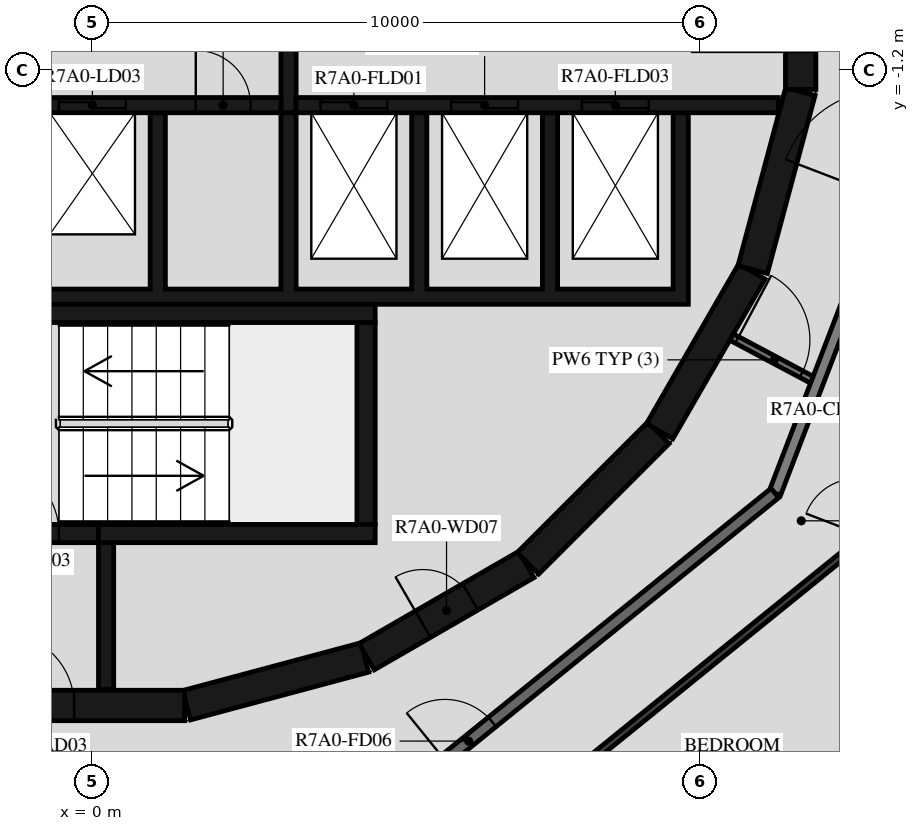
"""IFC4 building model, lengths in metres.
Left out: names, types, materials, properties, quantities, classifications, styles, units other than length and angle.
Written with IfcOpenShell. Run it as: python <this file> out.ifc"""

import sys

from ifc_helpers import new_model, si_unit, direction, frame, frame_2d, origin, place, context, subcontext, project, spatial, polyline, rectangle, outline, extrude, element, fill, save


model = new_model("IFC4")
c1 = context("Model", 3, precision=1e-05, world=origin(), true_north=direction((0.0, 1.0)))
c2 = subcontext(c1, "Body", "Model", "MODEL_VIEW")
j1 = project(units=[si_unit("LENGTHUNIT", "METRE"), si_unit("PLANEANGLEUNIT", "RADIAN")], contexts=[c1])
p1 = place(None, origin())
s1 = spatial("IfcSite", under=j1, at=p1, CompositionType="ELEMENT")
p2 = place(p1, origin())
s2 = spatial("IfcBuilding", under=s1, at=p2, CompositionType="ELEMENT")
p3 = place(p2, frame((0.0, 0.0, 263.4)))
s3 = spatial("IfcBuildingStorey", under=s2, at=p3, CompositionType="ELEMENT", Elevation=263.4)
p4 = place(p3, frame((24.757, -7.212, 0.03), z_axis=(0.0, 0.0, 1.0), x_axis=(-0.843392095095, -0.537298589177, 0.0)))
e1 = element("IfcWall", 1, at=p4, inside=s3, PredefinedType="PARAPET", context=c2, shape_type="SweptSolid", body=[
    extrude(rectangle(XDim=34.009, YDim=0.2, at=frame_2d((17.004, 0.0))), origin(), (0.0, 0.0, 1.0), 1.5),
])
p5 = place(p3, frame((1.55, -11.643, 0.0), z_axis=(0.0, 0.0, 1.0), x_axis=(0.965948410781, 0.258734743916, 0.0)))
e2 = element("IfcWall", 2, at=p5, inside=s3, PredefinedType="SHEAR", context=c2, shape_type="SweptSolid", body=[
    extrude(rectangle(XDim=3.033, YDim=0.5, at=frame_2d((1.516, 0.0))), origin(), (0.0, 0.0, 1.0), 3.12),
])
p6 = place(p3, frame((4.51, -10.845, 0.0), z_axis=(0.0, 0.0, 1.0), x_axis=(0.865975092491, 0.500087131594, 0.0)))
e3 = element("IfcWall", 3, at=p6, inside=s3, PredefinedType="SHEAR", context=c2, shape_type="SweptSolid", body=[
    extrude(rectangle(XDim=3.033, YDim=0.5, at=frame_2d((1.516, 0.0))), origin(), (0.0, 0.0, 1.0), 3.12),
])
p7 = place(p6, frame((1.066, 0.0, 0.0)))
e4 = element("IfcOpeningElement", 4, at=p7, cuts=e3, PredefinedType="OPENING", context=c2, shape_type="SweptSolid", body=[
    extrude(rectangle(XDim=0.9, YDim=2.1, at=frame_2d((0.45, 1.05))), frame((0.0, 0.26, 0.0), z_axis=(0.0, -1.0, 0.0), x_axis=(1.0, 0.0, 0.0)), (0.0, 0.0, 1.0), 0.52),
])
p8 = place(p3, frame((7.164, -9.308, 0.0), z_axis=(0.0, 0.0, 1.0), x_axis=(0.707106781187, 0.707106781187, 0.0)))
e5 = element("IfcWall", 5, at=p8, inside=s3, PredefinedType="SHEAR", context=c2, shape_type="SweptSolid", body=[
    extrude(rectangle(XDim=3.032, YDim=0.5, at=frame_2d((1.516, 0.0))), origin(), (0.0, 0.0, 1.0), 3.12),
])
for number, where, z_axis, x_axis in (
    (6, (9.329, -7.137, 0.0), (0.0, 0.0, 1.0), (0.5, 0.866, 0.0)),
    (7, (10.858, -4.479, 0.0), (0.0, 0.0, 1.0), (0.259, 0.966, 0.0)),
):
    element("IfcWall", number, at=place(p3, frame(where, z_axis=z_axis, x_axis=x_axis)), inside=s3, PredefinedType="SHEAR", context=c2, shape_type="SweptSolid", body=[
        extrude(rectangle(XDim=3.033, YDim=0.5, at=frame_2d((1.516, 0.0))), origin(), (0.0, 0.0, 1.0), 3.12),
    ])
p9 = place(p3, frame((11.647, -1.516, 0.0), z_axis=(0.0, 0.0, 1.0), x_axis=(0.0, 1.0, 0.0)))
e8 = element("IfcWall", 8, at=p9, inside=s3, PredefinedType="SHEAR", context=c2, shape_type="SweptSolid", body=[
    extrude(rectangle(XDim=3.033, YDim=0.5, at=frame_2d((1.516, 0.0))), origin(), (0.0, 0.0, 1.0), 3.12),
])
p10 = place(p9, frame((0.616, 0.0, 0.0)))
e9 = element("IfcOpeningElement", 9, at=p10, cuts=e8, PredefinedType="OPENING", context=c2, shape_type="SweptSolid", body=[
    extrude(rectangle(XDim=1.8, YDim=2.1, at=frame_2d((0.9, 1.05))), frame((0.0, 0.26, 0.0), z_axis=(0.0, -1.0, 0.0), x_axis=(1.0, 0.0, 0.0)), (0.0, 0.0, 1.0), 0.52),
])
p11 = place(p3, frame((-1.516, -11.647, 0.0), z_axis=(0.0, 0.0, 1.0), x_axis=(1.0, 0.0, 0.0)))
e10 = element("IfcWall", 10, at=p11, inside=s3, PredefinedType="SHEAR", context=c2, shape_type="SweptSolid", body=[
    extrude(rectangle(XDim=3.033, YDim=0.5, at=frame_2d((1.516, 0.0))), origin(), (0.0, 0.0, 1.0), 3.12),
])
p12 = place(p11, frame((0.016, 0.0, 0.0)))
e11 = element("IfcOpeningElement", 11, at=p12, cuts=e10, PredefinedType="OPENING", context=c2, shape_type="SweptSolid", body=[
    extrude(rectangle(XDim=1.2, YDim=2.1, at=frame_2d((0.6, 1.05))), frame((0.0, 0.26, 0.0), z_axis=(0.0, -1.0, 0.0), x_axis=(1.0, 0.0, 0.0)), (0.0, 0.0, 1.0), 0.52),
])
p13 = place(p3, frame((-2.4, -5.2, 0.0), z_axis=(0.0, 0.0, 1.0), x_axis=(1.0, 0.0, 0.0)))
e12 = element("IfcWall", 12, at=p13, inside=s3, PredefinedType="SHEAR", context=c2, shape_type="SweptSolid", body=[
    extrude(rectangle(XDim=7.05, YDim=0.3, at=frame_2d((3.525, 0.0))), origin(), (0.0, 0.0, 1.0), 3.12),
])
p14 = place(p3, frame((4.5, -8.67, 0.0), z_axis=(0.0, 0.0, 1.0), x_axis=(0.0, 1.0, 0.0)))
e13 = element("IfcWall", 13, at=p14, inside=s3, PredefinedType="SHEAR", context=c2, shape_type="SweptSolid", body=[
    extrude(rectangle(XDim=3.32, YDim=0.3, at=frame_2d((1.66, 0.0))), origin(), (0.0, 0.0, 1.0), 3.12),
])
p15 = place(p3, frame((0.1, -8.82, 0.0), z_axis=(0.0, 0.0, 1.0), x_axis=(1.0, 0.0, 0.0)))
e14 = element("IfcWall", 14, at=p15, inside=s3, PredefinedType="SHEAR", context=c2, shape_type="SweptSolid", body=[
    extrude(rectangle(XDim=4.55, YDim=0.3, at=frame_2d((2.275, 0.0))), origin(), (0.0, 0.0, 1.0), 3.12),
])
p16 = place(p3, frame((-2.4, -8.82, 0.0), z_axis=(0.0, 0.0, 1.0), x_axis=(1.0, 0.0, 0.0)))
e15 = element("IfcWall", 15, at=p16, inside=s3, PredefinedType="SHEAR", context=c2, shape_type="SweptSolid", body=[
    extrude(rectangle(XDim=2.5, YDim=0.3, at=frame_2d((1.25, 0.0))), origin(), (0.0, 0.0, 1.0), 3.12),
])
p17 = place(p16, frame((0.65, 0.0, 0.0)))
e16 = element("IfcOpeningElement", 16, at=p17, cuts=e15, PredefinedType="OPENING", context=c2, shape_type="SweptSolid", body=[
    extrude(rectangle(XDim=1.2, YDim=2.1, at=frame_2d((0.6, 1.05))), frame((0.0, 0.16, 0.0), z_axis=(0.0, -1.0, 0.0), x_axis=(1.0, 0.0, 0.0)), (0.0, 0.0, 1.0), 0.32),
])
p18 = place(p3, frame((0.225, -8.97, 0.0), z_axis=(0.0, 0.0, 1.0), x_axis=(0.0, -1.0, 0.0)))
e17 = element("IfcWall", 17, at=p18, inside=s3, PredefinedType="SHEAR", context=c2, shape_type="SweptSolid", body=[
    extrude(rectangle(XDim=2.41, YDim=0.25, at=frame_2d((1.205, 0.0))), origin(), (0.0, 0.0, 1.0), 3.12),
])
p19 = place(p3, origin())
e18 = element("IfcWall", 18, at=p19, inside=s3, PredefinedType="SHEAR", context=c2, shape_type="SweptSolid", body=[
    extrude(outline(polyline([(9.8, -5.05), (9.8, -4.8), (9.8, -1.9), (9.55, -1.9), (9.55, -4.8), (7.65, -4.8), (7.65, -1.9), (7.4, -1.9), (7.4, -4.8), (5.5, -4.8), (5.5, -1.9), (5.25, -1.9), (5.25, -4.8), (3.35, -4.8), (3.35, -1.9), (3.1, -1.9), (3.1, -4.8), (1.2, -4.8), (1.2, -1.9), (0.95, -1.9), (0.95, -4.8), (-0.95, -4.8), (-0.95, -1.9), (-1.2, -1.9), (-1.2, -4.8), (-3.1, -4.8), (-3.1, -1.9), (-3.35, -1.9), (-3.35, -4.8), (-5.25, -4.8), (-5.25, -1.9), (-5.5, -1.9), (-5.5, -4.8), (-7.4, -4.8), (-7.4, -1.9), (-7.65, -1.9), (-7.65, -4.8), (-9.55, -4.8), (-9.55, -1.9), (-9.8, -1.9), (-9.8, -4.8), (-9.8, -5.05), (9.8, -5.05)])), origin(), (0.0, 0.0, 1.0), 3.12),
])
p20 = place(p3, frame((-11.28, -1.775, 0.0), z_axis=(0.0, 0.0, 1.0), x_axis=(1.0, 0.0, 0.0)))
e19 = element("IfcWall", 19, at=p20, inside=s3, PredefinedType="SHEAR", context=c2, shape_type="SweptSolid", body=[
    extrude(rectangle(XDim=14.38, YDim=0.25, at=frame_2d((7.19, 0.0))), origin(), (0.0, 0.0, 1.0), 3.12),
])
p21 = place(p20, frame((2.03, 0.0, 0.0)))
e20 = element("IfcOpeningElement", 20, at=p21, cuts=e19, PredefinedType="OPENING", context=c2, shape_type="SweptSolid", body=[
    extrude(rectangle(XDim=1.3, YDim=2.1, at=frame_2d((0.65, 1.05))), frame((0.0, 0.135, 0.0), z_axis=(0.0, -1.0, 0.0), x_axis=(1.0, 0.0, 0.0)), (0.0, 0.0, 1.0), 0.27),
])
p22 = place(p20, frame((4.18, 0.0, 0.0)))
e21 = element("IfcOpeningElement", 21, at=p22, cuts=e19, PredefinedType="OPENING", context=c2, shape_type="SweptSolid", body=[
    extrude(rectangle(XDim=1.3, YDim=2.1, at=frame_2d((0.65, 1.05))), frame((0.0, 0.135, 0.0), z_axis=(0.0, -1.0, 0.0), x_axis=(1.0, 0.0, 0.0)), (0.0, 0.0, 1.0), 0.27),
])
p23 = place(p20, frame((6.43, 0.0, 0.0)))
e22 = element("IfcOpeningElement", 22, at=p23, cuts=e19, PredefinedType="OPENING", context=c2, shape_type="SweptSolid", body=[
    extrude(rectangle(XDim=1.1, YDim=2.1, at=frame_2d((0.55, 1.05))), frame((0.0, 0.135, 0.0), z_axis=(0.0, -1.0, 0.0), x_axis=(1.0, 0.0, 0.0)), (0.0, 0.0, 1.0), 0.27),
])
p24 = place(p20, frame((8.58, 0.0, 0.0)))
e23 = element("IfcOpeningElement", 23, at=p24, cuts=e19, PredefinedType="OPENING", context=c2, shape_type="SweptSolid", body=[
    extrude(rectangle(XDim=1.1, YDim=2.1, at=frame_2d((0.55, 1.05))), frame((0.0, 0.135, 0.0), z_axis=(0.0, -1.0, 0.0), x_axis=(1.0, 0.0, 0.0)), (0.0, 0.0, 1.0), 0.27),
])
p25 = place(p20, frame((10.73, 0.0, 0.0)))
e24 = element("IfcOpeningElement", 24, at=p25, cuts=e19, PredefinedType="OPENING", context=c2, shape_type="SweptSolid", body=[
    extrude(rectangle(XDim=1.1, YDim=2.1, at=frame_2d((0.55, 1.05))), frame((0.0, 0.135, 0.0), z_axis=(0.0, -1.0, 0.0), x_axis=(1.0, 0.0, 0.0)), (0.0, 0.0, 1.0), 0.27),
])
p26 = place(p20, frame((12.98, 0.0, 0.0)))
e25 = element("IfcOpeningElement", 25, at=p26, cuts=e19, PredefinedType="OPENING", context=c2, shape_type="SweptSolid", body=[
    extrude(rectangle(XDim=0.9, YDim=2.1, at=frame_2d((0.45, 1.05))), frame((0.0, 0.135, 0.0), z_axis=(0.0, -1.0, 0.0), x_axis=(1.0, 0.0, 0.0)), (0.0, 0.0, 1.0), 0.27),
])
p27 = place(p3, frame((3.35, -1.775, 0.0), z_axis=(0.0, 0.0, 1.0), x_axis=(1.0, 0.0, 0.0)))
e26 = element("IfcWall", 26, at=p27, inside=s3, PredefinedType="SHEAR", context=c2, shape_type="SweptSolid", body=[
    extrude(rectangle(XDim=7.93, YDim=0.25, at=frame_2d((3.965, 0.0))), origin(), (0.0, 0.0, 1.0), 3.12),
])
p28 = place(p27, frame((0.4, 0.0, 0.0)))
e27 = element("IfcOpeningElement", 27, at=p28, cuts=e26, PredefinedType="OPENING", context=c2, shape_type="SweptSolid", body=[
    extrude(rectangle(XDim=1.1, YDim=2.4, at=frame_2d((0.55, 1.2))), frame((0.0, 0.135, 0.0), z_axis=(0.0, -1.0, 0.0), x_axis=(1.0, 0.0, 0.0)), (0.0, 0.0, 1.0), 0.27),
])
p29 = place(p27, frame((2.55, 0.0, 0.0)))
e28 = element("IfcOpeningElement", 28, at=p29, cuts=e26, PredefinedType="OPENING", context=c2, shape_type="SweptSolid", body=[
    extrude(rectangle(XDim=1.1, YDim=2.4, at=frame_2d((0.55, 1.2))), frame((0.0, 0.135, 0.0), z_axis=(0.0, -1.0, 0.0), x_axis=(1.0, 0.0, 0.0)), (0.0, 0.0, 1.0), 0.27),
])
p30 = place(p27, frame((4.7, 0.0, 0.0)))
e29 = element("IfcOpeningElement", 29, at=p30, cuts=e26, PredefinedType="OPENING", context=c2, shape_type="SweptSolid", body=[
    extrude(rectangle(XDim=1.1, YDim=2.4, at=frame_2d((0.55, 1.2))), frame((0.0, 0.135, 0.0), z_axis=(0.0, -1.0, 0.0), x_axis=(1.0, 0.0, 0.0)), (0.0, 0.0, 1.0), 0.27),
])
p31 = place(p3, frame((3.225, -1.9, 0.0), z_axis=(0.0, 0.0, 1.0), x_axis=(0.0, 1.0, 0.0)))
e30 = element("IfcWall", 30, at=p31, inside=s3, PredefinedType="SHEAR", context=c2, shape_type="SweptSolid", body=[
    extrude(rectangle(XDim=3.8, YDim=0.25, at=frame_2d((1.9, 0.0))), origin(), (0.0, 0.0, 1.0), 3.12),
])
p32 = place(p3, frame((10.511, -5.589, 0.0), z_axis=(0.0, 0.0, 1.0), x_axis=(0.882983002821, -0.469404960273, 0.0)))
e31 = element("IfcWall", 31, at=p32, inside=s3, PredefinedType="PARTITIONING", context=c2, shape_type="SweptSolid", body=[
    extrude(rectangle(XDim=1.596, YDim=0.12, at=frame_2d((0.798, 0.0))), origin(), (0.0, 0.0, 1.0), 3.12),
])
p33 = place(p32, frame((0.1, 0.0, 0.0)))
e32 = element("IfcOpeningElement", 32, at=p33, cuts=e31, PredefinedType="OPENING", context=c2, shape_type="SweptSolid", body=[
    extrude(rectangle(XDim=1.2, YDim=2.1, at=frame_2d((0.6, 1.05))), frame((0.0, 0.07, 0.0), z_axis=(0.0, -1.0, 0.0), x_axis=(1.0, 0.0, 0.0)), (0.0, 0.0, 1.0), 0.14),
])
p34 = place(p3, frame((11.223, -8.154, 0.0), z_axis=(0.0, 0.0, 1.0), x_axis=(0.358341090983, 0.93359073609, 0.0)))
e33 = element("IfcWall", 33, at=p34, inside=s3, PredefinedType="STANDARD", context=c2, shape_type="SweptSolid", body=[
    extrude(rectangle(XDim=7.181, YDim=0.2, at=frame_2d((3.59, 0.0))), origin(), (0.0, 0.0, 1.0), 3.12),
])
p35 = place(p34, frame((5.185, 0.0, 0.0)))
e34 = element("IfcOpeningElement", 34, at=p35, cuts=e33, PredefinedType="OPENING", context=c2, shape_type="SweptSolid", body=[
    extrude(rectangle(XDim=1.8, YDim=2.1, at=frame_2d((0.9, 1.05))), frame((0.0, 0.11, 0.0), z_axis=(0.0, -1.0, 0.0), x_axis=(1.0, 0.0, 0.0)), (0.0, 0.0, 1.0), 0.22),
])
p36 = place(p3, frame((5.643, -12.673, 0.0), z_axis=(0.0, 0.0, 1.0), x_axis=(0.777160148113, 0.629302871585, 0.0)))
e35 = element("IfcWall", 35, at=p36, inside=s3, PredefinedType="STANDARD", context=c2, shape_type="SweptSolid", body=[
    extrude(rectangle(XDim=7.181, YDim=0.2, at=frame_2d((3.59, 0.0))), origin(), (0.0, 0.0, 1.0), 3.12),
])
p37 = place(p36, frame((0.2, 0.0, 0.0)))
e36 = element("IfcOpeningElement", 36, at=p37, cuts=e35, PredefinedType="OPENING", context=c2, shape_type="SweptSolid", body=[
    extrude(rectangle(XDim=1.0, YDim=2.1, at=frame_2d((0.5, 1.05))), frame((0.0, 0.11, 0.0), z_axis=(0.0, -1.0, 0.0), x_axis=(1.0, 0.0, 0.0)), (0.0, 0.0, 1.0), 0.22),
])
p38 = place(p3, frame((6.274, -14.092, 0.0), z_axis=(0.0, 0.0, 1.0), x_axis=(0.777135206268, 0.62933367237, 0.0)))
e37 = element("IfcWall", 37, at=p38, inside=s3, PredefinedType="PARTITIONING", context=c2, shape_type="SweptSolid", body=[
    extrude(rectangle(XDim=7.985, YDim=0.12, at=frame_2d((3.992, 0.0))), origin(), (0.0, 0.0, 1.0), 3.12),
])
p39 = place(p38, frame((0.2, 0.0, 0.0)))
e38 = element("IfcOpeningElement", 38, at=p39, cuts=e37, PredefinedType="OPENING", context=c2, shape_type="SweptSolid", body=[
    extrude(rectangle(XDim=0.9, YDim=2.1, at=frame_2d((0.45, 1.05))), frame((0.0, 0.07, 0.0), z_axis=(0.0, -1.0, 0.0), x_axis=(1.0, 0.0, 0.0)), (0.0, 0.0, 1.0), 0.14),
])
p40 = place(p17, origin())
e39 = element("IfcDoor", 39, at=p40, inside=s3, OperationType="SINGLE_SWING_LEFT", PredefinedType="DOOR", context=c2, shape_type="SweptSolid", body=[
    extrude(rectangle(XDim=1.2, YDim=2.1, at=frame_2d((0.6, 1.05))), frame((0.0, 0.025, 0.0), z_axis=(0.0, -1.0, 0.0), x_axis=(1.0, 0.0, 0.0)), (0.0, 0.0, 1.0), 0.05),
])
fill(e16, e39)
p41 = place(p12, origin())
e40 = element("IfcDoor", 40, at=p41, inside=s3, OperationType="SINGLE_SWING_RIGHT", PredefinedType="DOOR", context=c2, shape_type="SweptSolid", body=[
    extrude(rectangle(XDim=1.2, YDim=2.1, at=frame_2d((0.6, 1.05))), frame((0.0, 0.025, 0.0), z_axis=(0.0, -1.0, 0.0), x_axis=(1.0, 0.0, 0.0)), (0.0, 0.0, 1.0), 0.05),
])
fill(e11, e40)
p42 = place(p10, origin())
e41 = element("IfcDoor", 41, at=p42, inside=s3, OperationType="DOUBLE_DOOR_SINGLE_SWING", PredefinedType="DOOR", context=c2, shape_type="SweptSolid", body=[
    extrude(rectangle(XDim=1.8, YDim=2.1, at=frame_2d((0.9, 1.05))), frame((0.0, 0.025, 0.0), z_axis=(0.0, -1.0, 0.0), x_axis=(1.0, 0.0, 0.0)), (0.0, 0.0, 1.0), 0.05),
])
fill(e9, e41)
p43 = place(p25, origin())
e42 = element("IfcDoor", 42, at=p43, inside=s3, OperationType="DOUBLE_DOOR_SLIDING", PredefinedType="DOOR", context=c2, shape_type="SweptSolid", body=[
    extrude(rectangle(XDim=1.1, YDim=2.1, at=frame_2d((0.55, 1.05))), frame((0.0, 0.025, 0.0), z_axis=(0.0, -1.0, 0.0), x_axis=(1.0, 0.0, 0.0)), (0.0, 0.0, 1.0), 0.05),
])
fill(e24, e42)
p44 = place(p28, origin())
e43 = element("IfcDoor", 43, at=p44, inside=s3, OperationType="DOUBLE_DOOR_SLIDING", PredefinedType="DOOR", context=c2, shape_type="SweptSolid", body=[
    extrude(rectangle(XDim=1.1, YDim=2.4, at=frame_2d((0.55, 1.2))), frame((0.0, 0.025, 0.0), z_axis=(0.0, -1.0, 0.0), x_axis=(1.0, 0.0, 0.0)), (0.0, 0.0, 1.0), 0.05),
])
fill(e27, e43)
p45 = place(p29, origin())
e44 = element("IfcDoor", 44, at=p45, inside=s3, OperationType="DOUBLE_DOOR_SLIDING", PredefinedType="DOOR", context=c2, shape_type="SweptSolid", body=[
    extrude(rectangle(XDim=1.1, YDim=2.4, at=frame_2d((0.55, 1.2))), frame((0.0, 0.025, 0.0), z_axis=(0.0, -1.0, 0.0), x_axis=(1.0, 0.0, 0.0)), (0.0, 0.0, 1.0), 0.05),
])
fill(e28, e44)
p46 = place(p30, origin())
e45 = element("IfcDoor", 45, at=p46, inside=s3, OperationType="DOUBLE_DOOR_SLIDING", PredefinedType="DOOR", context=c2, shape_type="SweptSolid", body=[
    extrude(rectangle(XDim=1.1, YDim=2.4, at=frame_2d((0.55, 1.2))), frame((0.0, 0.025, 0.0), z_axis=(0.0, -1.0, 0.0), x_axis=(1.0, 0.0, 0.0)), (0.0, 0.0, 1.0), 0.05),
])
fill(e29, e45)
p47 = place(p26, origin())
e46 = element("IfcDoor", 46, at=p47, inside=s3, OperationType="SINGLE_SWING_LEFT", PredefinedType="DOOR", context=c2, shape_type="SweptSolid", body=[
    extrude(rectangle(XDim=0.9, YDim=2.1, at=frame_2d((0.45, 1.05))), frame((0.0, 0.025, 0.0), z_axis=(0.0, -1.0, 0.0), x_axis=(1.0, 0.0, 0.0)), (0.0, 0.0, 1.0), 0.05),
])
fill(e25, e46)
p48 = place(p7, origin())
e47 = element("IfcDoor", 47, at=p48, inside=s3, OperationType="SINGLE_SWING_LEFT", PredefinedType="DOOR", context=c2, shape_type="SweptSolid", body=[
    extrude(rectangle(XDim=0.9, YDim=2.1, at=frame_2d((0.45, 1.05))), frame((0.0, 0.025, 0.0), z_axis=(0.0, -1.0, 0.0), x_axis=(1.0, 0.0, 0.0)), (0.0, 0.0, 1.0), 0.05),
])
fill(e4, e47)
p49 = place(p37, origin())
e48 = element("IfcDoor", 48, at=p49, inside=s3, OperationType="SINGLE_SWING_LEFT", PredefinedType="DOOR", context=c2, shape_type="SweptSolid", body=[
    extrude(rectangle(XDim=1.0, YDim=2.1, at=frame_2d((0.5, 1.05))), frame((0.0, 0.025, 0.0), z_axis=(0.0, -1.0, 0.0), x_axis=(1.0, 0.0, 0.0)), (0.0, 0.0, 1.0), 0.05),
])
fill(e36, e48)
p50 = place(p33, origin())
e49 = element("IfcDoor", 49, at=p50, inside=s3, OperationType="DOUBLE_DOOR_SINGLE_SWING", PredefinedType="DOOR", context=c2, shape_type="SweptSolid", body=[
    extrude(rectangle(XDim=1.2, YDim=2.1, at=frame_2d((0.6, 1.05))), frame((0.0, 0.025, 0.0), z_axis=(0.0, -1.0, 0.0), x_axis=(1.0, 0.0, 0.0)), (0.0, 0.0, 1.0), 0.05),
])
fill(e32, e49)
save(model, sys.argv[1])
